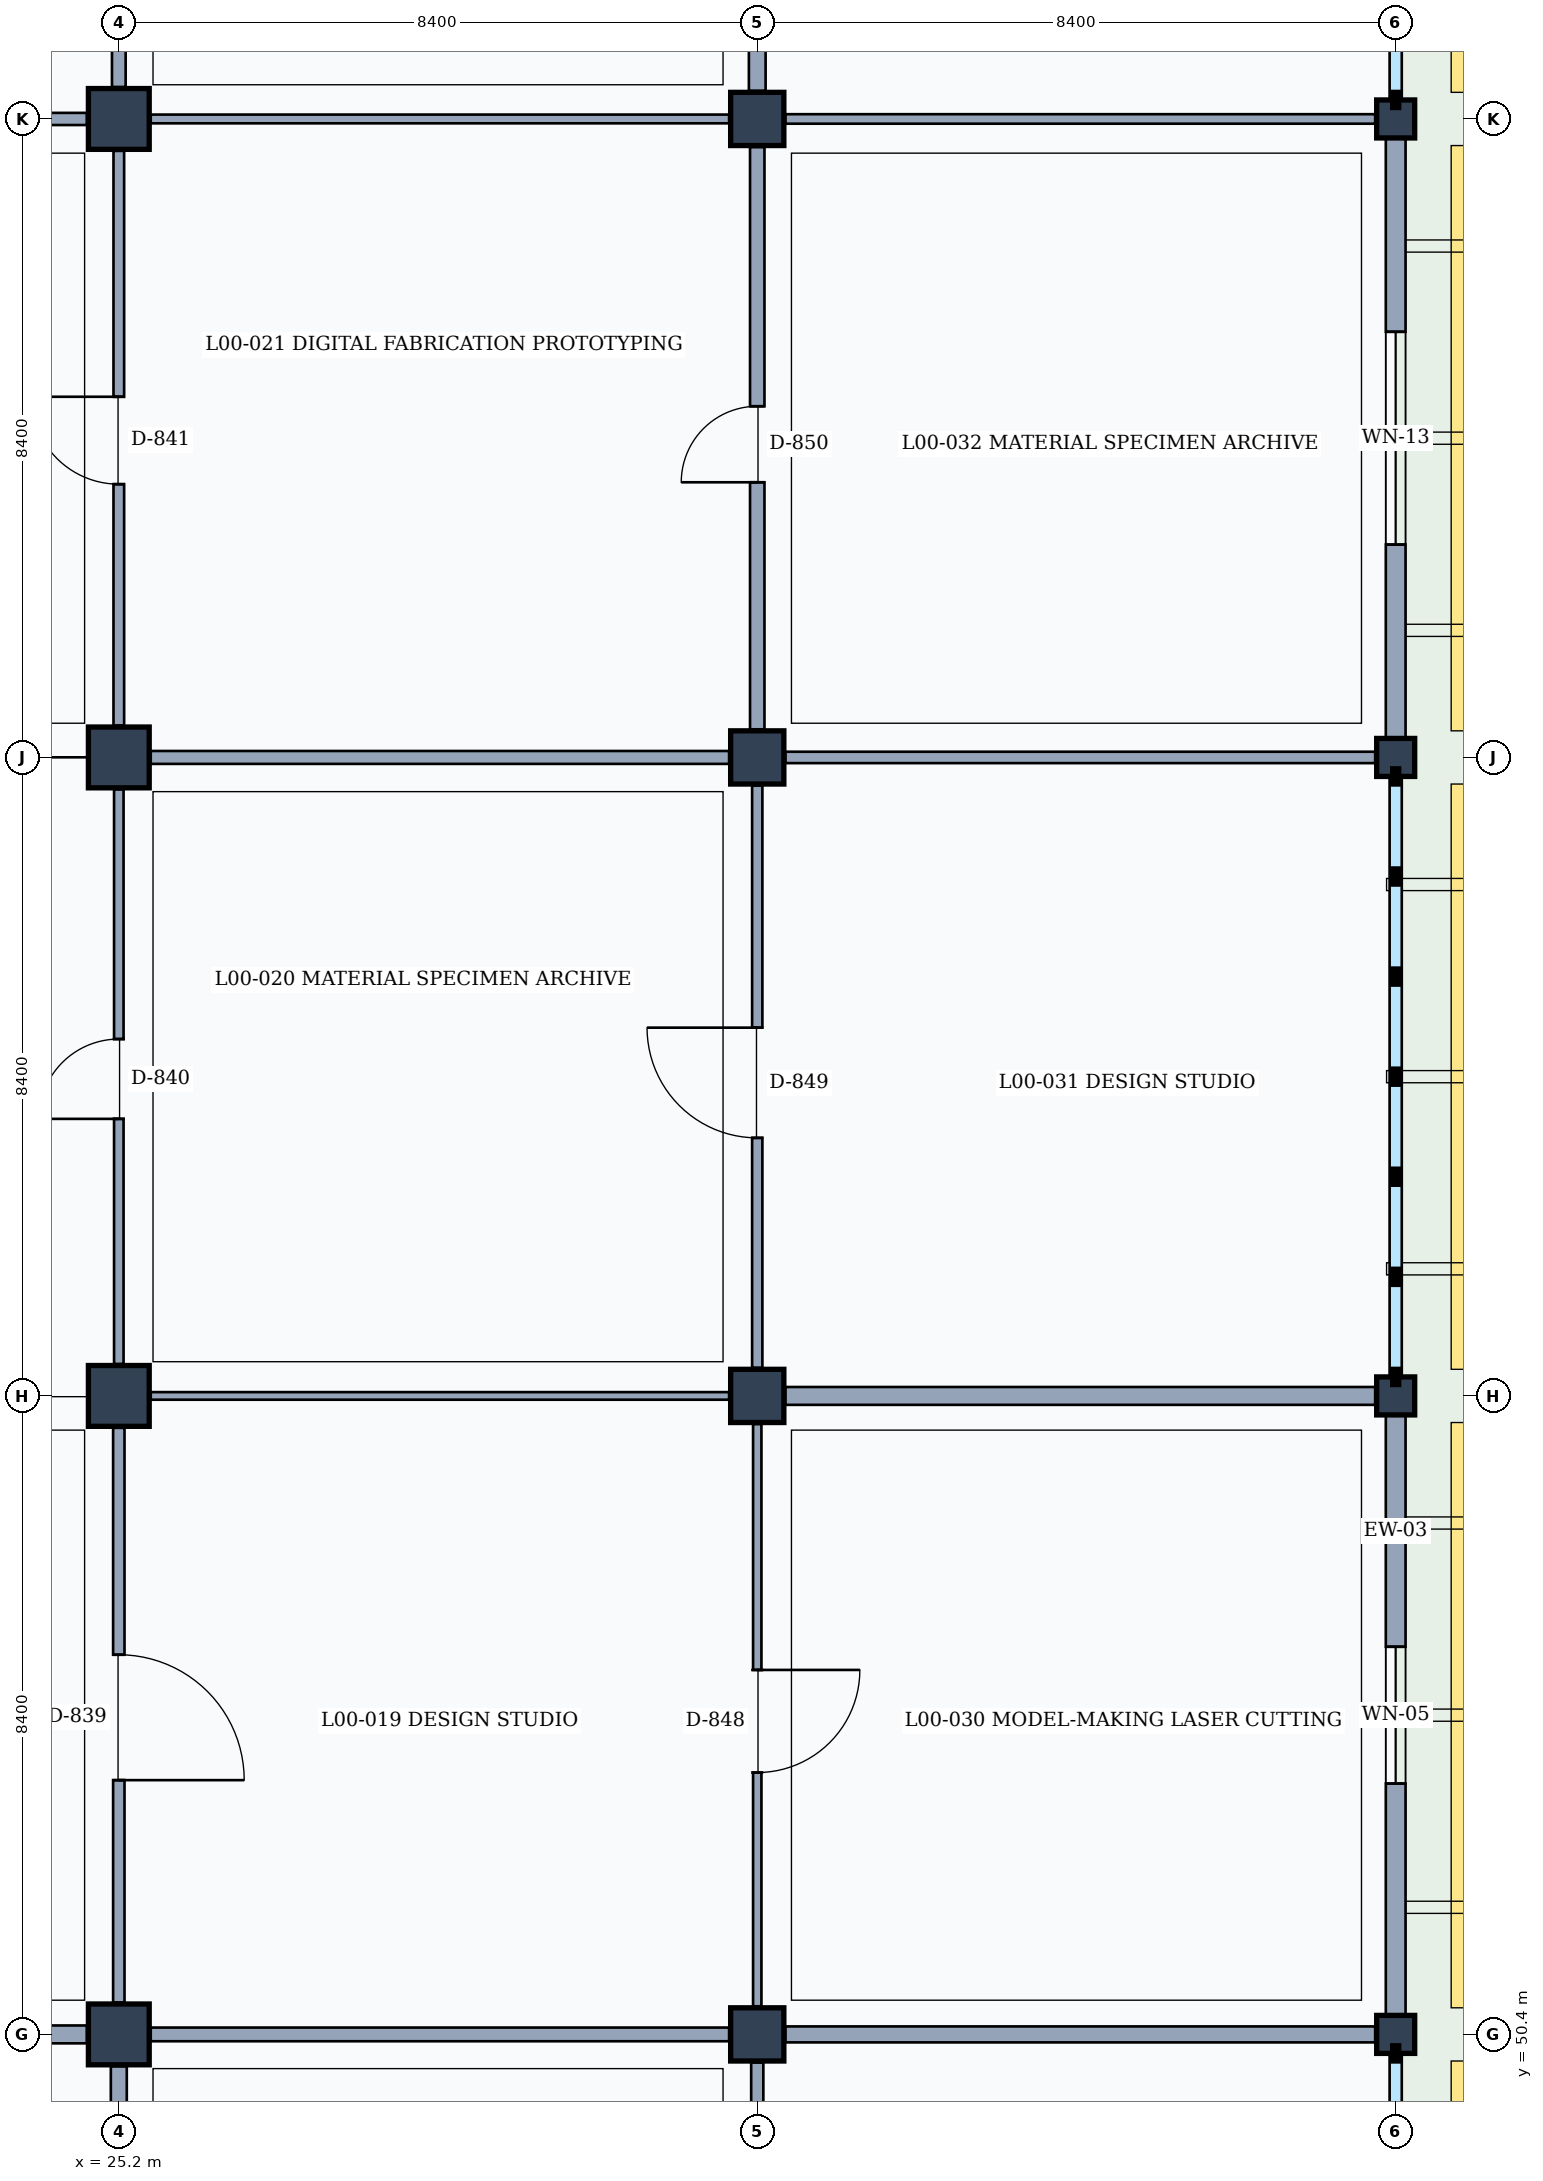
"""IFC4 building model, lengths in metres.
Left out: names, types, materials, properties, quantities, classifications, styles, units other than length and angle.
Written with IfcOpenShell. Run it as: python <this file> out.ifc"""

import sys

from ifc_helpers import new_model, si_unit, direction, frame, frame_2d, origin, origin_2d, place, context, subcontext, project, spatial, rectangle, extrude, element, fill, save


model = new_model("IFC4")
c1 = context("Model", 3, precision=1e-05, world=origin(), true_north=direction((0.0, 1.0)))
c2 = subcontext(c1, "Body", "Model", "MODEL_VIEW")
j1 = project(units=[si_unit("LENGTHUNIT", "METRE"), si_unit("PLANEANGLEUNIT", "RADIAN")], contexts=[c1])
p1 = place(None, origin())
s1 = spatial("IfcSite", under=j1, at=p1, CompositionType="ELEMENT")
p2 = place(p1, origin())
s2 = spatial("IfcBuilding", under=s1, at=p2, CompositionType="ELEMENT")
p3 = place(p2, origin())
s3 = spatial("IfcBuildingStorey", under=s2, at=p3, CompositionType="ELEMENT", Elevation=0.0)
for number, where, z_axis, x_axis in (
    (1, (25.2, 50.4, 0.0), (0.0, 0.0, 1.0), (1.0, 0.0, 0.0)),
    (2, (25.2, 58.8, 0.0), (0.0, 0.0, 1.0), (1.0, 0.0, 0.0)),
    (3, (25.2, 67.2, 0.0), (0.0, 0.0, 1.0), (1.0, 0.0, 0.0)),
    (4, (25.2, 75.6, 0.0), (0.0, 0.0, 1.0), (1.0, 0.0, 0.0)),
):
    element("IfcColumn", number, at=place(p3, frame(where, z_axis=z_axis, x_axis=x_axis)), inside=s3, PredefinedType="COLUMN", context=c2, shape_type="SweptSolid", body=[
        extrude(rectangle(XDim=0.8, YDim=0.8, at=origin_2d()), origin(), (0.0, 0.0, 1.0), 4.8),
    ])
for number, where, z_axis, x_axis in (
    (5, (33.6, 50.4, 0.0), (0.0, 0.0, 1.0), (1.0, 0.0, 0.0)),
    (6, (33.6, 58.8, 0.0), (0.0, 0.0, 1.0), (1.0, 0.0, 0.0)),
    (7, (33.6, 67.2, 0.0), (0.0, 0.0, 1.0), (1.0, 0.0, 0.0)),
    (8, (33.6, 75.6, 0.0), (0.0, 0.0, 1.0), (1.0, 0.0, 0.0)),
):
    element("IfcColumn", number, at=place(p3, frame(where, z_axis=z_axis, x_axis=x_axis)), inside=s3, PredefinedType="COLUMN", context=c2, shape_type="SweptSolid", body=[
        extrude(rectangle(XDim=0.7, YDim=0.7, at=origin_2d()), origin(), (0.0, 0.0, 1.0), 4.8),
    ])
for number, where, z_axis, x_axis in (
    (9, (42.0, 50.4, 0.0), (0.0, 0.0, 1.0), (1.0, 0.0, 0.0)),
    (10, (42.0, 58.8, 0.0), (0.0, 0.0, 1.0), (1.0, 0.0, 0.0)),
    (11, (42.0, 67.2, 0.0), (0.0, 0.0, 1.0), (1.0, 0.0, 0.0)),
    (12, (42.0, 75.6, 0.0), (0.0, 0.0, 1.0), (1.0, 0.0, 0.0)),
):
    element("IfcColumn", number, at=place(p3, frame(where, z_axis=z_axis, x_axis=x_axis)), inside=s3, PredefinedType="COLUMN", context=c2, shape_type="SweptSolid", body=[
        extrude(rectangle(XDim=0.5, YDim=0.5, at=origin_2d()), origin(), (0.0, 0.0, 1.0), 4.8),
    ])
p4 = place(p3, frame((42.0, 58.55, 0.0), z_axis=(0.0, 0.0, 1.0), x_axis=(0.0, -1.0, 0.0)))
e13 = element("IfcWall", 13, at=p4, inside=s3, PredefinedType="SOLIDWALL", context=c2, shape_type="SweptSolid", body=[
    extrude(rectangle(XDim=7.9, YDim=0.26, at=frame_2d((3.95, 0.0))), origin(), (0.0, 0.0, 1.0), 3.96),
])
p5 = place(p4, frame((3.05, 0.0, 0.95)))
e14 = element("IfcOpeningElement", 14, at=p5, cuts=e13, PredefinedType="OPENING", context=c2, shape_type="SweptSolid", body=[
    extrude(rectangle(XDim=1.8, YDim=1.5, at=frame_2d((0.9, 0.75))), frame((0.0, 0.14, 0.0), z_axis=(0.0, -1.0, 0.0), x_axis=(1.0, 0.0, 0.0)), (0.0, 0.0, 1.0), 0.28),
])
p6 = place(p3, frame((42.0, 75.35, 0.0), z_axis=(0.0, 0.0, 1.0), x_axis=(0.0, -1.0, 0.0)))
e15 = element("IfcWall", 15, at=p6, inside=s3, PredefinedType="SOLIDWALL", context=c2, shape_type="SweptSolid", body=[
    extrude(rectangle(XDim=7.9, YDim=0.26, at=frame_2d((3.95, 0.0))), origin(), (0.0, 0.0, 1.0), 3.96),
])
p7 = place(p6, frame((2.55, 0.0, 0.95)))
e16 = element("IfcOpeningElement", 16, at=p7, cuts=e15, PredefinedType="OPENING", context=c2, shape_type="SweptSolid", body=[
    extrude(rectangle(XDim=2.8, YDim=1.65, at=frame_2d((1.4, 0.825))), frame((0.0, 0.14, 0.0), z_axis=(0.0, -1.0, 0.0), x_axis=(1.0, 0.0, 0.0)), (0.0, 0.0, 1.0), 0.28),
])
p8 = place(p3, frame((25.2, 42.32, 0.0), z_axis=(0.0, 0.0, 1.0), x_axis=(0.0, 1.0, 0.0)))
e17 = element("IfcWall", 17, at=p8, inside=s3, PredefinedType="PARTITIONING", context=c2, shape_type="SweptSolid", body=[
    extrude(rectangle(XDim=7.66, YDim=0.21, at=frame_2d((3.83, 0.0))), origin(), (0.0, 0.0, 1.0), 3.92),
])
p9 = place(p8, frame((3.0, 0.0, 0.0)))
e18 = element("IfcOpeningElement", 18, at=p9, cuts=e17, PredefinedType="OPENING", context=c2, shape_type="SweptSolid", body=[
    extrude(rectangle(XDim=1.5, YDim=2.3, at=frame_2d((0.75, 1.15))), frame((0.0, 0.115, 0.0), z_axis=(0.0, -1.0, 0.0), x_axis=(1.0, 0.0, 0.0)), (0.0, 0.0, 1.0), 0.23),
])
p10 = place(p3, frame((17.22, 50.4, 0.0), z_axis=(0.0, 0.0, 1.0), x_axis=(1.0, 0.0, 0.0)))
e19 = element("IfcWall", 19, at=p10, inside=s3, PredefinedType="PARTITIONING", context=c2, shape_type="SweptSolid", body=[
    extrude(rectangle(XDim=7.56, YDim=0.235, at=frame_2d((3.78, 0.0))), origin(), (0.0, 0.0, 1.0), 3.87),
])
p11 = place(p3, frame((25.2, 50.82, 0.0), z_axis=(0.0, 0.0, 1.0), x_axis=(0.0, 1.0, 0.0)))
e20 = element("IfcWall", 20, at=p11, inside=s3, PredefinedType="PARTITIONING", context=c2, shape_type="SweptSolid", body=[
    extrude(rectangle(XDim=7.56, YDim=0.15, at=frame_2d((3.78, 0.0))), origin(), (0.0, 0.0, 1.0), 3.92),
])
p12 = place(p11, frame((2.925, 0.0, 0.0)))
e21 = element("IfcOpeningElement", 21, at=p12, cuts=e20, PredefinedType="OPENING", context=c2, shape_type="SweptSolid", body=[
    extrude(rectangle(XDim=1.65, YDim=2.25, at=frame_2d((0.825, 1.125))), frame((0.0, 0.085, 0.0), z_axis=(0.0, -1.0, 0.0), x_axis=(1.0, 0.0, 0.0)), (0.0, 0.0, 1.0), 0.17),
])
p13 = place(p3, frame((25.2, 59.22, 0.0), z_axis=(0.0, 0.0, 1.0), x_axis=(0.0, 1.0, 0.0)))
e22 = element("IfcWall", 22, at=p13, inside=s3, PredefinedType="PARTITIONING", context=c2, shape_type="SweptSolid", body=[
    extrude(rectangle(XDim=7.56, YDim=0.125, at=frame_2d((3.78, 0.0))), origin(), (0.0, 0.0, 1.0), 3.92),
])
p14 = place(p13, frame((3.225, 0.0, 0.0)))
e23 = element("IfcOpeningElement", 23, at=p14, cuts=e22, PredefinedType="OPENING", context=c2, shape_type="SweptSolid", body=[
    extrude(rectangle(XDim=1.05, YDim=2.2, at=frame_2d((0.525, 1.1))), frame((0.0, 0.073, 0.0), z_axis=(0.0, -1.0, 0.0), x_axis=(1.0, 0.0, 0.0)), (0.0, 0.0, 1.0), 0.145),
])
p15 = place(p3, frame((25.2, 67.62, 0.0), z_axis=(0.0, 0.0, 1.0), x_axis=(0.0, 1.0, 0.0)))
e24 = element("IfcWall", 24, at=p15, inside=s3, PredefinedType="PARTITIONING", context=c2, shape_type="SweptSolid", body=[
    extrude(rectangle(XDim=7.56, YDim=0.14, at=frame_2d((3.78, 0.0))), origin(), (0.0, 0.0, 1.0), 3.92),
])
p16 = place(p15, frame((3.175, 0.0, 0.0)))
e25 = element("IfcOpeningElement", 25, at=p16, cuts=e24, PredefinedType="OPENING", context=c2, shape_type="SweptSolid", body=[
    extrude(rectangle(XDim=1.15, YDim=2.25, at=frame_2d((0.575, 1.125))), frame((0.0, 0.08, 0.0), z_axis=(0.0, -1.0, 0.0), x_axis=(1.0, 0.0, 0.0)), (0.0, 0.0, 1.0), 0.16),
])
p17 = place(p3, frame((17.22, 75.6, 0.0), z_axis=(0.0, 0.0, 1.0), x_axis=(1.0, 0.0, 0.0)))
e26 = element("IfcWall", 26, at=p17, inside=s3, PredefinedType="PARTITIONING", context=c2, shape_type="SweptSolid", body=[
    extrude(rectangle(XDim=7.56, YDim=0.16, at=frame_2d((3.78, 0.0))), origin(), (0.0, 0.0, 1.0), 3.87),
])
p18 = place(p3, frame((25.2, 76.02, 0.0), z_axis=(0.0, 0.0, 1.0), x_axis=(0.0, 1.0, 0.0)))
e27 = element("IfcWall", 27, at=p18, inside=s3, PredefinedType="PARTITIONING", context=c2, shape_type="SweptSolid", body=[
    extrude(rectangle(XDim=7.56, YDim=0.18, at=frame_2d((3.78, 0.0))), origin(), (0.0, 0.0, 1.0), 3.92),
])
p19 = place(p3, frame((33.6, 42.32, 0.0), z_axis=(0.0, 0.0, 1.0), x_axis=(0.0, 1.0, 0.0)))
e28 = element("IfcWall", 28, at=p19, inside=s3, PredefinedType="PARTITIONING", context=c2, shape_type="SweptSolid", body=[
    extrude(rectangle(XDim=7.71, YDim=0.16, at=frame_2d((3.855, 0.0))), origin(), (0.0, 0.0, 1.0), 3.92),
])
p20 = place(p19, frame((3.125, 0.0, 0.0)))
e29 = element("IfcOpeningElement", 29, at=p20, cuts=e28, PredefinedType="OPENING", context=c2, shape_type="SweptSolid", body=[
    extrude(rectangle(XDim=1.25, YDim=2.3, at=frame_2d((0.625, 1.15))), frame((0.0, 0.09, 0.0), z_axis=(0.0, -1.0, 0.0), x_axis=(1.0, 0.0, 0.0)), (0.0, 0.0, 1.0), 0.18),
])
p21 = place(p3, frame((25.62, 50.4, 0.0), z_axis=(0.0, 0.0, 1.0), x_axis=(1.0, 0.0, 0.0)))
e30 = element("IfcWall", 30, at=p21, inside=s3, PredefinedType="PARTITIONING", context=c2, shape_type="SweptSolid", body=[
    extrude(rectangle(XDim=7.61, YDim=0.18, at=frame_2d((3.805, 0.0))), origin(), (0.0, 0.0, 1.0), 3.87),
])
p22 = place(p3, frame((33.6, 50.77, 0.0), z_axis=(0.0, 0.0, 1.0), x_axis=(0.0, 1.0, 0.0)))
e31 = element("IfcWall", 31, at=p22, inside=s3, PredefinedType="PARTITIONING", context=c2, shape_type="SweptSolid", body=[
    extrude(rectangle(XDim=7.66, YDim=0.11, at=frame_2d((3.83, 0.0))), origin(), (0.0, 0.0, 1.0), 3.92),
])
p23 = place(p22, frame((3.075, 0.0, 0.0)))
e32 = element("IfcOpeningElement", 32, at=p23, cuts=e31, PredefinedType="OPENING", context=c2, shape_type="SweptSolid", body=[
    extrude(rectangle(XDim=1.35, YDim=2.25, at=frame_2d((0.675, 1.125))), frame((0.0, 0.065, 0.0), z_axis=(0.0, -1.0, 0.0), x_axis=(1.0, 0.0, 0.0)), (0.0, 0.0, 1.0), 0.13),
])
p24 = place(p3, frame((25.62, 58.8, 0.0), z_axis=(0.0, 0.0, 1.0), x_axis=(1.0, 0.0, 0.0)))
e33 = element("IfcWall", 33, at=p24, inside=s3, PredefinedType="MOVABLE", context=c2, shape_type="SweptSolid", body=[
    extrude(rectangle(XDim=7.61, YDim=0.1, at=frame_2d((3.805, 0.0))), origin(), (0.0, 0.0, 1.0), 3.87),
])
p25 = place(p3, frame((33.6, 59.17, 0.0), z_axis=(0.0, 0.0, 1.0), x_axis=(0.0, 1.0, 0.0)))
e34 = element("IfcWall", 34, at=p25, inside=s3, PredefinedType="PARTITIONING", context=c2, shape_type="SweptSolid", body=[
    extrude(rectangle(XDim=7.66, YDim=0.135, at=frame_2d((3.83, 0.0))), origin(), (0.0, 0.0, 1.0), 3.92),
])
p26 = place(p25, frame((3.025, 0.0, 0.0)))
e35 = element("IfcOpeningElement", 35, at=p26, cuts=e34, PredefinedType="OPENING", context=c2, shape_type="SweptSolid", body=[
    extrude(rectangle(XDim=1.45, YDim=2.35, at=frame_2d((0.725, 1.175))), frame((0.0, 0.077, 0.0), z_axis=(0.0, -1.0, 0.0), x_axis=(1.0, 0.0, 0.0)), (0.0, 0.0, 1.0), 0.155),
])
p27 = place(p3, frame((25.62, 67.2, 0.0), z_axis=(0.0, 0.0, 1.0), x_axis=(1.0, 0.0, 0.0)))
e36 = element("IfcWall", 36, at=p27, inside=s3, PredefinedType="PARTITIONING", context=c2, shape_type="SweptSolid", body=[
    extrude(rectangle(XDim=7.61, YDim=0.17, at=frame_2d((3.805, 0.0))), origin(), (0.0, 0.0, 1.0), 3.87),
])
p28 = place(p3, frame((33.6, 67.57, 0.0), z_axis=(0.0, 0.0, 1.0), x_axis=(0.0, 1.0, 0.0)))
e37 = element("IfcWall", 37, at=p28, inside=s3, PredefinedType="PARTITIONING", context=c2, shape_type="SweptSolid", body=[
    extrude(rectangle(XDim=7.66, YDim=0.19, at=frame_2d((3.83, 0.0))), origin(), (0.0, 0.0, 1.0), 3.92),
])
p29 = place(p28, frame((3.25, 0.0, 0.0)))
e38 = element("IfcOpeningElement", 38, at=p29, cuts=e37, PredefinedType="OPENING", context=c2, shape_type="SweptSolid", body=[
    extrude(rectangle(XDim=1.0, YDim=2.15, at=frame_2d((0.5, 1.075))), frame((0.0, 0.105, 0.0), z_axis=(0.0, -1.0, 0.0), x_axis=(1.0, 0.0, 0.0)), (0.0, 0.0, 1.0), 0.21),
])
p30 = place(p3, frame((25.62, 75.6, 0.0), z_axis=(0.0, 0.0, 1.0), x_axis=(1.0, 0.0, 0.0)))
e39 = element("IfcWall", 39, at=p30, inside=s3, PredefinedType="PARTITIONING", context=c2, shape_type="SweptSolid", body=[
    extrude(rectangle(XDim=7.61, YDim=0.115, at=frame_2d((3.805, 0.0))), origin(), (0.0, 0.0, 1.0), 3.87),
])
p31 = place(p3, frame((33.6, 75.97, 0.0), z_axis=(0.0, 0.0, 1.0), x_axis=(0.0, 1.0, 0.0)))
e40 = element("IfcWall", 40, at=p31, inside=s3, PredefinedType="PARTITIONING", context=c2, shape_type="SweptSolid", body=[
    extrude(rectangle(XDim=7.66, YDim=0.22, at=frame_2d((3.83, 0.0))), origin(), (0.0, 0.0, 1.0), 3.92),
])
p32 = place(p3, frame((33.97, 50.4, 0.0), z_axis=(0.0, 0.0, 1.0), x_axis=(1.0, 0.0, 0.0)))
e41 = element("IfcWall", 41, at=p32, inside=s3, PredefinedType="PARTITIONING", context=c2, shape_type="SweptSolid", body=[
    extrude(rectangle(XDim=7.76, YDim=0.21, at=frame_2d((3.88, 0.0))), origin(), (0.0, 0.0, 1.0), 3.86),
])
p33 = place(p3, frame((33.97, 58.8, 0.0), z_axis=(0.0, 0.0, 1.0), x_axis=(1.0, 0.0, 0.0)))
e42 = element("IfcWall", 42, at=p33, inside=s3, PredefinedType="PARTITIONING", context=c2, shape_type="SweptSolid", body=[
    extrude(rectangle(XDim=7.76, YDim=0.235, at=frame_2d((3.88, 0.0))), origin(), (0.0, 0.0, 1.0), 3.87),
])
p34 = place(p3, frame((33.97, 67.2, 0.0), z_axis=(0.0, 0.0, 1.0), x_axis=(1.0, 0.0, 0.0)))
e43 = element("IfcWall", 43, at=p34, inside=s3, PredefinedType="PARTITIONING", context=c2, shape_type="SweptSolid", body=[
    extrude(rectangle(XDim=7.76, YDim=0.15, at=frame_2d((3.88, 0.0))), origin(), (0.0, 0.0, 1.0), 3.87),
])
p35 = place(p3, frame((33.97, 75.6, 0.0), z_axis=(0.0, 0.0, 1.0), x_axis=(1.0, 0.0, 0.0)))
e44 = element("IfcWall", 44, at=p35, inside=s3, PredefinedType="PARTITIONING", context=c2, shape_type="SweptSolid", body=[
    extrude(rectangle(XDim=7.76, YDim=0.125, at=frame_2d((3.88, 0.0))), origin(), (0.0, 0.0, 1.0), 3.87),
])
p36 = place(p5, origin())
e45 = element("IfcWindow", 45, at=p36, inside=s3, PartitioningType="SINGLE_PANEL", PredefinedType="WINDOW", context=c2, shape_type="SweptSolid", body=[
    extrude(rectangle(XDim=1.8, YDim=1.5, at=frame_2d((0.9, 0.75))), frame((0.0, 0.03, 0.0), z_axis=(0.0, -1.0, 0.0), x_axis=(1.0, 0.0, 0.0)), (0.0, 0.0, 1.0), 0.06),
])
fill(e14, e45)
p37 = place(p7, origin())
e46 = element("IfcWindow", 46, at=p37, inside=s3, PartitioningType="SINGLE_PANEL", PredefinedType="WINDOW", context=c2, shape_type="SweptSolid", body=[
    extrude(rectangle(XDim=2.8, YDim=1.65, at=frame_2d((1.4, 0.825))), frame((0.0, 0.03, 0.0), z_axis=(0.0, -1.0, 0.0), x_axis=(1.0, 0.0, 0.0)), (0.0, 0.0, 1.0), 0.06),
])
fill(e16, e46)
p38 = place(p12, frame((1.65, 0.0, 0.0), z_axis=(0.0, 0.0, 1.0), x_axis=(-1.0, 0.0, 0.0)))
e47 = element("IfcDoor", 47, at=p38, inside=s3, OperationType="SINGLE_SWING_RIGHT", PredefinedType="DOOR", context=c2, shape_type="SweptSolid", body=[
    extrude(rectangle(XDim=1.65, YDim=2.25, at=frame_2d((0.825, 1.125))), frame((0.0, 0.025, 0.0), z_axis=(0.0, -1.0, 0.0), x_axis=(1.0, 0.0, 0.0)), (0.0, 0.0, 1.0), 0.05),
])
fill(e21, e47)
p39 = place(p14, origin())
e48 = element("IfcDoor", 48, at=p39, inside=s3, OperationType="SINGLE_SWING_LEFT", PredefinedType="DOOR", context=c2, shape_type="SweptSolid", body=[
    extrude(rectangle(XDim=1.05, YDim=2.2, at=frame_2d((0.525, 1.1))), frame((0.0, 0.025, 0.0), z_axis=(0.0, -1.0, 0.0), x_axis=(1.0, 0.0, 0.0)), (0.0, 0.0, 1.0), 0.05),
])
fill(e23, e48)
p40 = place(p16, origin())
e49 = element("IfcDoor", 49, at=p40, inside=s3, OperationType="SINGLE_SWING_RIGHT", PredefinedType="DOOR", context=c2, shape_type="SweptSolid", body=[
    extrude(rectangle(XDim=1.15, YDim=2.25, at=frame_2d((0.575, 1.125))), frame((0.0, 0.025, 0.0), z_axis=(0.0, -1.0, 0.0), x_axis=(1.0, 0.0, 0.0)), (0.0, 0.0, 1.0), 0.05),
])
fill(e25, e49)
p41 = place(p23, frame((1.35, 0.0, 0.0), z_axis=(0.0, 0.0, 1.0), x_axis=(-1.0, 0.0, 0.0)))
e50 = element("IfcDoor", 50, at=p41, inside=s3, OperationType="SINGLE_SWING_LEFT", PredefinedType="DOOR", context=c2, shape_type="SweptSolid", body=[
    extrude(rectangle(XDim=1.35, YDim=2.25, at=frame_2d((0.675, 1.125))), frame((0.0, 0.025, 0.0), z_axis=(0.0, -1.0, 0.0), x_axis=(1.0, 0.0, 0.0)), (0.0, 0.0, 1.0), 0.05),
])
fill(e32, e50)
p42 = place(p26, origin())
e51 = element("IfcDoor", 51, at=p42, inside=s3, OperationType="SINGLE_SWING_RIGHT", PredefinedType="DOOR", context=c2, shape_type="SweptSolid", body=[
    extrude(rectangle(XDim=1.45, YDim=2.35, at=frame_2d((0.725, 1.175))), frame((0.0, 0.025, 0.0), z_axis=(0.0, -1.0, 0.0), x_axis=(1.0, 0.0, 0.0)), (0.0, 0.0, 1.0), 0.05),
])
fill(e35, e51)
p43 = place(p29, origin())
e52 = element("IfcDoor", 52, at=p43, inside=s3, OperationType="SINGLE_SWING_LEFT", PredefinedType="DOOR", context=c2, shape_type="SweptSolid", body=[
    extrude(rectangle(XDim=1.0, YDim=2.15, at=frame_2d((0.5, 1.075))), frame((0.0, 0.025, 0.0), z_axis=(0.0, -1.0, 0.0), x_axis=(1.0, 0.0, 0.0)), (0.0, 0.0, 1.0), 0.05),
])
fill(e38, e52)
save(model, sys.argv[1])
